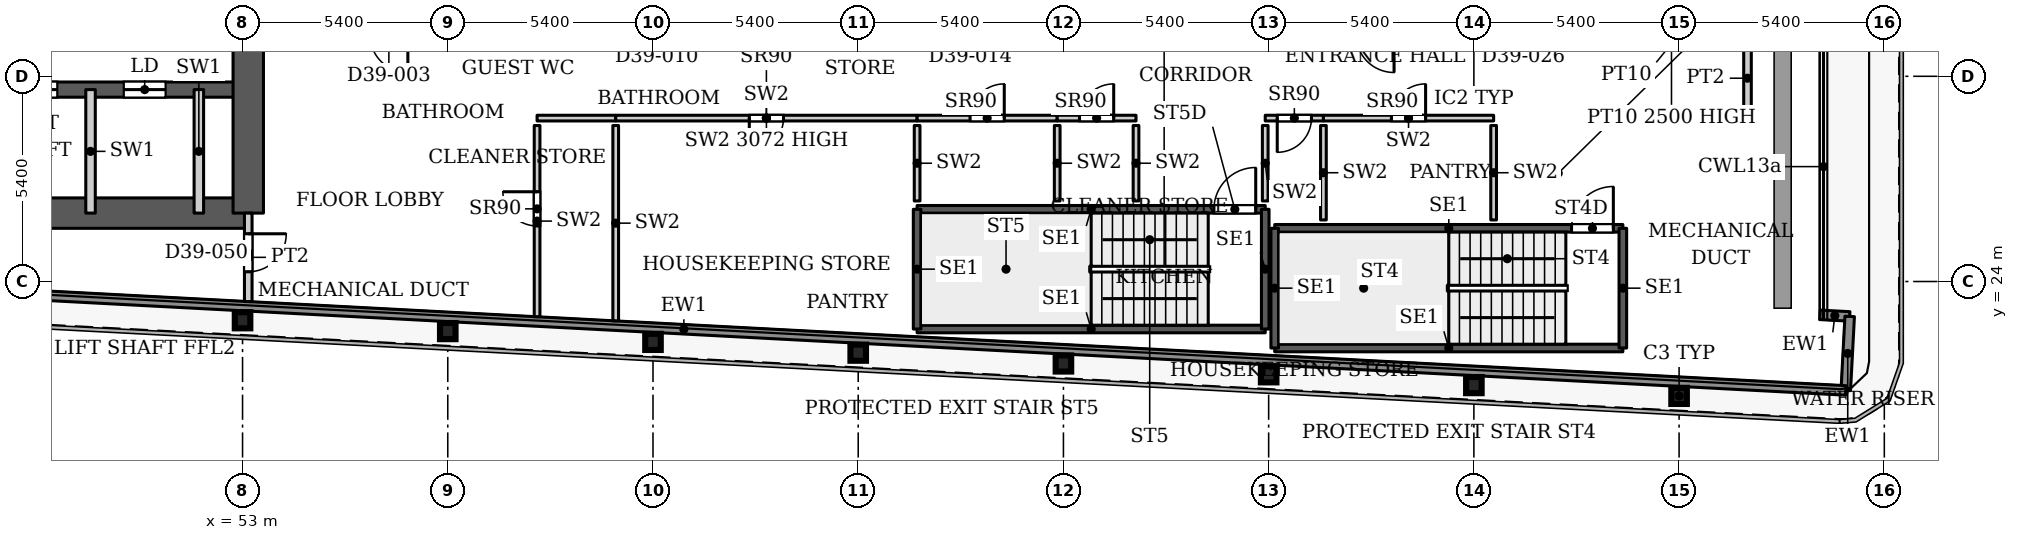
"""IFC4 building model, lengths in metres.
Left out: names, types, materials, properties, quantities, classifications, styles, units other than length and angle.
Written with IfcOpenShell. Run it as: python <this file> out.ifc"""

import sys

from ifc_helpers import new_model, si_unit, direction, frame, frame_2d, origin, origin_2d, place, context, subcontext, project, spatial, rectangle, i_section, extrude, source, transform, mapped, element, fill, save


model = new_model("IFC4")
c1 = context("Model", 3, precision=1e-05, world=origin(), true_north=direction((0.0, 1.0)))
c2 = subcontext(c1, "Body", "Model", "MODEL_VIEW")
j1 = project(units=[si_unit("LENGTHUNIT", "METRE"), si_unit("PLANEANGLEUNIT", "RADIAN")], contexts=[c1])
p1 = place(None, origin())
s1 = spatial("IfcSite", under=j1, at=p1, CompositionType="ELEMENT")
p2 = place(p1, origin())
s2 = spatial("IfcBuilding", under=s1, at=p2, CompositionType="ELEMENT")
p3 = place(p2, frame((0.0, 0.0, 168.2)))
s3 = spatial("IfcBuildingStorey", under=s2, at=p3, CompositionType="ELEMENT", Elevation=168.2)
for number, where, z_axis, x_axis in (
    (1, (90.8, 20.99, 0.0), (0.0, 0.0, 1.0), (1.0, 0.0, 0.0)),
    (2, (85.4, 21.274, 0.0), (0.0, 0.0, 1.0), (1.0, 0.0, 0.0)),
    (3, (80.0, 21.558, 0.0), (0.0, 0.0, 1.0), (1.0, 0.0, 0.0)),
    (4, (74.6, 21.843, 0.0), (0.0, 0.0, 1.0), (1.0, 0.0, 0.0)),
    (5, (69.2, 22.127, 0.0), (0.0, 0.0, 1.0), (1.0, 0.0, 0.0)),
    (6, (63.8, 22.411, 0.0), (0.0, 0.0, 1.0), (1.0, 0.0, 0.0)),
    (7, (58.4, 22.695, 0.0), (0.0, 0.0, 1.0), (1.0, 0.0, 0.0)),
    (8, (53.0, 22.98, 0.0), (0.0, 0.0, 1.0), (1.0, 0.0, 0.0)),
):
    element("IfcColumn", number, at=place(p3, frame(where, z_axis=z_axis, x_axis=x_axis)), inside=s3, PredefinedType="COLUMN", context=c2, shape_type="SweptSolid", body=[
        extrude(i_section(OverallWidth=0.409, OverallDepth=0.425, WebThickness=0.033, FlangeThickness=0.052, FilletRadius=0.013, at=origin_2d()), origin(), (0.0, 0.0, 1.0), 3.9),
    ])
p4 = place(p3, frame((34.75, 25.8, 0.0), z_axis=(0.0, 0.0, 1.0), x_axis=(1.0, 0.0, 0.0)))
e9 = element("IfcWall", 9, at=p4, inside=s3, PredefinedType="SHEAR", context=c2, shape_type="SweptSolid", body=[
    extrude(rectangle(XDim=18.4, YDim=0.8, at=frame_2d((9.2, 0.0))), origin(), (0.0, 0.0, 1.0), 3.9),
])
p5 = place(p3, frame((34.75, 29.05, 0.0), z_axis=(0.0, 0.0, 1.0), x_axis=(1.0, 0.0, 0.0)))
e10 = element("IfcWall", 10, at=p5, inside=s3, PredefinedType="SHEAR", context=c2, shape_type="SweptSolid", body=[
    extrude(rectangle(XDim=18.4, YDim=0.4, at=frame_2d((9.2, 0.0))), origin(), (0.0, 0.0, 1.0), 3.9),
])
p6 = place(p5, frame((0.875, 0.0, 0.0)))
e11 = element("IfcOpeningElement", 11, at=p6, cuts=e10, PredefinedType="OPENING", context=c2, shape_type="SweptSolid", body=[
    extrude(rectangle(XDim=1.1, YDim=2.2, at=frame_2d((0.55, 1.1))), frame((0.0, 0.21, 0.0), z_axis=(0.0, -1.0, 0.0), x_axis=(1.0, 0.0, 0.0)), (0.0, 0.0, 1.0), 0.42),
])
p7 = place(p5, frame((3.725, 0.0, 0.0)))
e12 = element("IfcOpeningElement", 12, at=p7, cuts=e10, PredefinedType="OPENING", context=c2, shape_type="SweptSolid", body=[
    extrude(rectangle(XDim=1.1, YDim=2.2, at=frame_2d((0.55, 1.1))), frame((0.0, 0.21, 0.0), z_axis=(0.0, -1.0, 0.0), x_axis=(1.0, 0.0, 0.0)), (0.0, 0.0, 1.0), 0.42),
])
p8 = place(p5, frame((6.575, 0.0, 0.0)))
e13 = element("IfcOpeningElement", 13, at=p8, cuts=e10, PredefinedType="OPENING", context=c2, shape_type="SweptSolid", body=[
    extrude(rectangle(XDim=1.1, YDim=2.2, at=frame_2d((0.55, 1.1))), frame((0.0, 0.21, 0.0), z_axis=(0.0, -1.0, 0.0), x_axis=(1.0, 0.0, 0.0)), (0.0, 0.0, 1.0), 0.42),
])
p9 = place(p5, frame((9.425, 0.0, 0.0)))
e14 = element("IfcOpeningElement", 14, at=p9, cuts=e10, PredefinedType="OPENING", context=c2, shape_type="SweptSolid", body=[
    extrude(rectangle(XDim=1.1, YDim=2.2, at=frame_2d((0.55, 1.1))), frame((0.0, 0.21, 0.0), z_axis=(0.0, -1.0, 0.0), x_axis=(1.0, 0.0, 0.0)), (0.0, 0.0, 1.0), 0.42),
])
p10 = place(p5, frame((12.275, 0.0, 0.0)))
e15 = element("IfcOpeningElement", 15, at=p10, cuts=e10, PredefinedType="OPENING", context=c2, shape_type="SweptSolid", body=[
    extrude(rectangle(XDim=1.1, YDim=2.2, at=frame_2d((0.55, 1.1))), frame((0.0, 0.21, 0.0), z_axis=(0.0, -1.0, 0.0), x_axis=(1.0, 0.0, 0.0)), (0.0, 0.0, 1.0), 0.42),
])
p11 = place(p5, frame((15.125, 0.0, 0.0)))
e16 = element("IfcOpeningElement", 16, at=p11, cuts=e10, PredefinedType="OPENING", context=c2, shape_type="SweptSolid", body=[
    extrude(rectangle(XDim=1.1, YDim=2.2, at=frame_2d((0.55, 1.1))), frame((0.0, 0.21, 0.0), z_axis=(0.0, -1.0, 0.0), x_axis=(1.0, 0.0, 0.0)), (0.0, 0.0, 1.0), 0.42),
])
p12 = place(p3, frame((53.15, 25.8, 0.0), z_axis=(0.0, 0.0, 1.0), x_axis=(0.0, 1.0, 0.0)))
e17 = element("IfcWall", 17, at=p12, inside=s3, PredefinedType="SHEAR", context=c2, shape_type="SweptSolid", body=[
    extrude(rectangle(XDim=10.4, YDim=0.8, at=frame_2d((5.2, 0.0))), origin(), (0.0, 0.0, 1.0), 3.9),
])
p13 = place(p3, frame((94.507, 23.123, 0.0), z_axis=(0.0, 0.0, 1.0), x_axis=(0.998561284263, -0.053622398031, 0.0)))
e18 = element("IfcWall", 18, at=p13, inside=s3, PredefinedType="SOLIDWALL", context=c2, shape_type="SweptSolid", body=[
    extrude(rectangle(XDim=0.783, YDim=0.25, at=frame_2d((0.392, 0.0))), origin(), (0.0, 0.0, 1.0), 3.75),
])
p14 = place(p3, frame((95.289, 23.081, 0.0), z_axis=(0.0, 0.0, 1.0), x_axis=(-0.052841433274, -0.998602915542, 0.0)))
e19 = element("IfcWall", 19, at=p14, inside=s3, PredefinedType="SOLIDWALL", context=c2, shape_type="SweptSolid", body=[
    extrude(rectangle(XDim=1.95, YDim=0.25, at=frame_2d((0.975, 0.0))), origin(), (0.0, 0.0, 1.0), 3.75),
])
p15 = place(p3, frame((95.186, 21.134, 0.0), z_axis=(0.0, 0.0, 1.0), x_axis=(-0.998617201448, 0.052570761569, 0.0)))
e20 = element("IfcWall", 20, at=p15, inside=s3, PredefinedType="SOLIDWALL", context=c2, shape_type="SweptSolid", body=[
    extrude(rectangle(XDim=61.232, YDim=0.25, at=frame_2d((30.616, 0.0))), origin(), (0.0, 0.0, 1.0), 3.75),
])
p16 = place(p3, frame((80.16, 22.25, 0.0), z_axis=(0.0, 0.0, 1.0), x_axis=(1.0, 0.0, 0.0)))
e21 = element("IfcWall", 21, at=p16, inside=s3, PredefinedType="SHEAR", context=c2, shape_type="SweptSolid", body=[
    extrude(rectangle(XDim=9.16, YDim=0.2, at=frame_2d((4.58, 0.0))), origin(), (0.0, 0.0, 1.0), 3.9),
])
p17 = place(p3, frame((80.16, 25.4, 0.0), z_axis=(0.0, 0.0, 1.0), x_axis=(1.0, 0.0, 0.0)))
e22 = element("IfcWall", 22, at=p17, inside=s3, PredefinedType="SHEAR", context=c2, shape_type="SweptSolid", body=[
    extrude(rectangle(XDim=9.16, YDim=0.2, at=frame_2d((4.58, 0.0))), origin(), (0.0, 0.0, 1.0), 3.9),
])
p18 = place(p17, frame((7.81, 0.0, 0.0)))
e23 = element("IfcOpeningElement", 23, at=p18, cuts=e22, PredefinedType="OPENING", context=c2, shape_type="SweptSolid", body=[
    extrude(rectangle(XDim=1.1, YDim=2.2, at=frame_2d((0.55, 1.1))), frame((0.0, 0.11, 0.0), z_axis=(0.0, -1.0, 0.0), x_axis=(1.0, 0.0, 0.0)), (0.0, 0.0, 1.0), 0.22),
])
for number, where, z_axis, x_axis in (
    (24, (80.16, 22.25, 0.0), (0.0, 0.0, 1.0), (0.0, 1.0, 0.0)),
    (25, (89.32, 22.25, 0.0), (0.0, 0.0, 1.0), (0.0, 1.0, 0.0)),
):
    element("IfcWall", number, at=place(p3, frame(where, z_axis=z_axis, x_axis=x_axis)), inside=s3, PredefinedType="SHEAR", context=c2, shape_type="SweptSolid", body=[
        extrude(rectangle(XDim=3.15, YDim=0.2, at=frame_2d((1.575, 0.0))), origin(), (0.0, 0.0, 1.0), 3.9),
    ])
p19 = place(p3, frame((70.75, 22.75, 0.0), z_axis=(0.0, 0.0, 1.0), x_axis=(1.0, 0.0, 0.0)))
e26 = element("IfcWall", 26, at=p19, inside=s3, PredefinedType="SHEAR", context=c2, shape_type="SweptSolid", body=[
    extrude(rectangle(XDim=9.16, YDim=0.2, at=frame_2d((4.58, 0.0))), origin(), (0.0, 0.0, 1.0), 3.9),
])
p20 = place(p3, frame((70.75, 25.9, 0.0), z_axis=(0.0, 0.0, 1.0), x_axis=(1.0, 0.0, 0.0)))
e27 = element("IfcWall", 27, at=p20, inside=s3, PredefinedType="SHEAR", context=c2, shape_type="SweptSolid", body=[
    extrude(rectangle(XDim=9.16, YDim=0.2, at=frame_2d((4.58, 0.0))), origin(), (0.0, 0.0, 1.0), 3.9),
])
p21 = place(p20, frame((7.81, 0.0, 0.0)))
e28 = element("IfcOpeningElement", 28, at=p21, cuts=e27, PredefinedType="OPENING", context=c2, shape_type="SweptSolid", body=[
    extrude(rectangle(XDim=1.1, YDim=2.2, at=frame_2d((0.55, 1.1))), frame((0.0, 0.11, 0.0), z_axis=(0.0, -1.0, 0.0), x_axis=(1.0, 0.0, 0.0)), (0.0, 0.0, 1.0), 0.22),
])
for number, where, z_axis, x_axis in (
    (29, (70.75, 22.75, 0.0), (0.0, 0.0, 1.0), (0.0, 1.0, 0.0)),
    (30, (79.91, 22.75, 0.0), (0.0, 0.0, 1.0), (0.0, 1.0, 0.0)),
):
    element("IfcWall", number, at=place(p3, frame(where, z_axis=z_axis, x_axis=x_axis)), inside=s3, PredefinedType="SHEAR", context=c2, shape_type="SweptSolid", body=[
        extrude(rectangle(XDim=3.15, YDim=0.2, at=frame_2d((1.575, 0.0))), origin(), (0.0, 0.0, 1.0), 3.9),
    ])
for number, where, z_axis, x_axis in (
    (31, (49.0, 25.8, 0.0), (0.0, 0.0, 1.0), (0.0, 1.0, 0.0)),
    (32, (51.85, 25.8, 0.0), (0.0, 0.0, 1.0), (0.0, 1.0, 0.0)),
):
    element("IfcWall", number, at=place(p3, frame(where, z_axis=z_axis, x_axis=x_axis)), inside=s3, PredefinedType="PARTITIONING", context=c2, shape_type="SweptSolid", body=[
        extrude(rectangle(XDim=3.25, YDim=0.25, at=frame_2d((1.625, 0.0))), origin(), (0.0, 0.0, 1.0), 3.9),
    ])
p22 = place(p3, frame((60.75, 28.3, 0.0), z_axis=(0.0, 0.0, 1.0), x_axis=(1.0, 0.0, 0.0)))
e33 = element("IfcWall", 33, at=p22, inside=s3, PredefinedType="PARTITIONING", context=c2, shape_type="SweptSolid", body=[
    extrude(rectangle(XDim=2.069, YDim=0.15, at=frame_2d((1.035, 0.0))), origin(), (0.0, 0.0, 1.0), 3.9),
])
p23 = place(p3, frame((60.75, 23.075, 0.0), z_axis=(0.0, 0.0, 1.0), x_axis=(0.0, 1.0, 0.0)))
e34 = element("IfcWall", 34, at=p23, inside=s3, PredefinedType="PARTITIONING", context=c2, shape_type="SweptSolid", body=[
    extrude(rectangle(XDim=5.03, YDim=0.15, at=frame_2d((2.515, 0.0))), origin(), (0.0, 0.0, 1.0), 3.9),
])
p24 = place(p23, frame((2.387, 0.0, 0.0)))
e35 = element("IfcOpeningElement", 35, at=p24, cuts=e34, PredefinedType="OPENING", context=c2, shape_type="SweptSolid", body=[
    extrude(rectangle(XDim=0.9, YDim=2.2, at=frame_2d((0.45, 1.1))), frame((0.0, 0.085, 0.0), z_axis=(0.0, -1.0, 0.0), x_axis=(1.0, 0.0, 0.0)), (0.0, 0.0, 1.0), 0.17),
])
p25 = place(p3, frame((62.819, 22.966, 0.0), z_axis=(0.0, 0.0, 1.0), x_axis=(0.0, 1.0, 0.0)))
e36 = element("IfcWall", 36, at=p25, inside=s3, PredefinedType="PARTITIONING", context=c2, shape_type="SweptSolid", body=[
    extrude(rectangle(XDim=5.139, YDim=0.15, at=frame_2d((2.569, 0.0))), origin(), (0.0, 0.0, 1.0), 3.9),
])
p26 = place(p3, frame((62.819, 28.3, 0.0), z_axis=(0.0, 0.0, 1.0), x_axis=(1.0, 0.0, 0.0)))
e37 = element("IfcWall", 37, at=p26, inside=s3, PredefinedType="PARTITIONING", context=c2, shape_type="SweptSolid", body=[
    extrude(rectangle(XDim=7.931, YDim=0.15, at=frame_2d((3.965, 0.0))), origin(), (0.0, 0.0, 1.0), 3.072),
])
p27 = place(p26, frame((3.515, 0.0, 0.0)))
e38 = element("IfcOpeningElement", 38, at=p27, cuts=e37, PredefinedType="OPENING", context=c2, shape_type="SweptSolid", body=[
    extrude(rectangle(XDim=0.9, YDim=2.2, at=frame_2d((0.45, 1.1))), frame((0.0, 0.085, 0.0), z_axis=(0.0, -1.0, 0.0), x_axis=(1.0, 0.0, 0.0)), (0.0, 0.0, 1.0), 0.17),
])
p28 = place(p3, frame((70.75, 26.12, 0.0), z_axis=(0.0, 0.0, 1.0), x_axis=(0.0, 1.0, 0.0)))
e39 = element("IfcWall", 39, at=p28, inside=s3, PredefinedType="PARTITIONING", context=c2, shape_type="SweptSolid", body=[
    extrude(rectangle(XDim=1.985, YDim=0.15, at=frame_2d((0.992, 0.0))), origin(), (0.0, 0.0, 1.0), 3.9),
])
p29 = place(p3, frame((70.75, 28.3, 0.0), z_axis=(0.0, 0.0, 1.0), x_axis=(1.0, 0.0, 0.0)))
e40 = element("IfcWall", 40, at=p29, inside=s3, PredefinedType="PARTITIONING", context=c2, shape_type="SweptSolid", body=[
    extrude(rectangle(XDim=3.686, YDim=0.15, at=frame_2d((1.843, 0.0))), origin(), (0.0, 0.0, 1.0), 3.9),
])
p30 = place(p29, frame((1.393, 0.0, 0.0)))
e41 = element("IfcOpeningElement", 41, at=p30, cuts=e40, PredefinedType="OPENING", context=c2, shape_type="SweptSolid", body=[
    extrude(rectangle(XDim=0.9, YDim=2.2, at=frame_2d((0.45, 1.1))), frame((0.0, 0.085, 0.0), z_axis=(0.0, -1.0, 0.0), x_axis=(1.0, 0.0, 0.0)), (0.0, 0.0, 1.0), 0.17),
])
p31 = place(p3, frame((74.436, 26.12, 0.0), z_axis=(0.0, 0.0, 1.0), x_axis=(0.0, 1.0, 0.0)))
e42 = element("IfcWall", 42, at=p31, inside=s3, PredefinedType="PARTITIONING", context=c2, shape_type="SweptSolid", body=[
    extrude(rectangle(XDim=1.985, YDim=0.15, at=frame_2d((0.992, 0.0))), origin(), (0.0, 0.0, 1.0), 3.9),
])
p32 = place(p3, frame((74.436, 28.3, 0.0), z_axis=(0.0, 0.0, 1.0), x_axis=(1.0, 0.0, 0.0)))
e43 = element("IfcWall", 43, at=p32, inside=s3, PredefinedType="PARTITIONING", context=c2, shape_type="SweptSolid", body=[
    extrude(rectangle(XDim=2.074, YDim=0.15, at=frame_2d((1.037, 0.0))), origin(), (0.0, 0.0, 1.0), 3.9),
])
p33 = place(p32, frame((0.587, 0.0, 0.0)))
e44 = element("IfcOpeningElement", 44, at=p33, cuts=e43, PredefinedType="OPENING", context=c2, shape_type="SweptSolid", body=[
    extrude(rectangle(XDim=0.9, YDim=2.2, at=frame_2d((0.45, 1.1))), frame((0.0, 0.085, 0.0), z_axis=(0.0, -1.0, 0.0), x_axis=(1.0, 0.0, 0.0)), (0.0, 0.0, 1.0), 0.17),
])
p34 = place(p3, frame((76.51, 26.12, 0.0), z_axis=(0.0, 0.0, 1.0), x_axis=(0.0, 1.0, 0.0)))
e45 = element("IfcWall", 45, at=p34, inside=s3, PredefinedType="PARTITIONING", context=c2, shape_type="SweptSolid", body=[
    extrude(rectangle(XDim=1.985, YDim=0.15, at=frame_2d((0.992, 0.0))), origin(), (0.0, 0.0, 1.0), 3.9),
])
p35 = place(p3, frame((79.91, 28.3, 0.0), z_axis=(0.0, 0.0, 1.0), x_axis=(1.0, 0.0, 0.0)))
e46 = element("IfcWall", 46, at=p35, inside=s3, PredefinedType="PARTITIONING", context=c2, shape_type="SweptSolid", body=[
    extrude(rectangle(XDim=1.531, YDim=0.15, at=frame_2d((0.766, 0.0))), origin(), (0.0, 0.0, 1.0), 3.9),
])
p36 = place(p35, frame((0.316, 0.0, 0.0)))
e47 = element("IfcOpeningElement", 47, at=p36, cuts=e46, PredefinedType="OPENING", context=c2, shape_type="SweptSolid", body=[
    extrude(rectangle(XDim=0.9, YDim=2.2, at=frame_2d((0.45, 1.1))), frame((0.0, 0.085, 0.0), z_axis=(0.0, -1.0, 0.0), x_axis=(1.0, 0.0, 0.0)), (0.0, 0.0, 1.0), 0.17),
])
p37 = place(p3, frame((79.91, 26.12, 0.0), z_axis=(0.0, 0.0, 1.0), x_axis=(0.0, 1.0, 0.0)))
e48 = element("IfcWall", 48, at=p37, inside=s3, PredefinedType="PARTITIONING", context=c2, shape_type="SweptSolid", body=[
    extrude(rectangle(XDim=1.985, YDim=0.15, at=frame_2d((0.992, 0.0))), origin(), (0.0, 0.0, 1.0), 3.9),
])
p38 = place(p3, frame((81.441, 25.62, 0.0), z_axis=(0.0, 0.0, 1.0), x_axis=(0.0, 1.0, 0.0)))
e49 = element("IfcWall", 49, at=p38, inside=s3, PredefinedType="PARTITIONING", context=c2, shape_type="SweptSolid", body=[
    extrude(rectangle(XDim=2.485, YDim=0.15, at=frame_2d((1.242, 0.0))), origin(), (0.0, 0.0, 1.0), 3.9),
])
p39 = place(p3, frame((81.441, 28.3, 0.0), z_axis=(0.0, 0.0, 1.0), x_axis=(1.0, 0.0, 0.0)))
e50 = element("IfcWall", 50, at=p39, inside=s3, PredefinedType="PARTITIONING", context=c2, shape_type="SweptSolid", body=[
    extrude(rectangle(XDim=4.479, YDim=0.15, at=frame_2d((2.24, 0.0))), origin(), (0.0, 0.0, 1.0), 3.9),
])
p40 = place(p39, frame((1.789, 0.0, 0.0)))
e51 = element("IfcOpeningElement", 51, at=p40, cuts=e50, PredefinedType="OPENING", context=c2, shape_type="SweptSolid", body=[
    extrude(rectangle(XDim=0.9, YDim=2.2, at=frame_2d((0.45, 1.1))), frame((0.0, 0.085, 0.0), z_axis=(0.0, -1.0, 0.0), x_axis=(1.0, 0.0, 0.0)), (0.0, 0.0, 1.0), 0.17),
])
p41 = place(p3, frame((85.92, 25.62, 0.0), z_axis=(0.0, 0.0, 1.0), x_axis=(0.0, 1.0, 0.0)))
e52 = element("IfcWall", 52, at=p41, inside=s3, PredefinedType="PARTITIONING", context=c2, shape_type="SweptSolid", body=[
    extrude(rectangle(XDim=2.485, YDim=0.15, at=frame_2d((1.242, 0.0))), origin(), (0.0, 0.0, 1.0), 3.9),
])
p42 = place(p3, frame((53.15, 23.472, 0.0), z_axis=(0.0, 0.0, 1.0), x_axis=(0.0, 1.0, 0.0)))
e53 = element("IfcWall", 53, at=p42, inside=s3, PredefinedType="PARTITIONING", context=c2, shape_type="SweptSolid", body=[
    extrude(rectangle(XDim=2.328, YDim=0.2, at=frame_2d((1.164, 0.0))), origin(), (0.0, 0.0, 1.0), 3.6),
])
p43 = place(p42, frame((0.784, 0.0, 0.0)))
e54 = element("IfcOpeningElement", 54, at=p43, cuts=e53, PredefinedType="OPENING", context=c2, shape_type="SweptSolid", body=[
    extrude(rectangle(XDim=1.0, YDim=2.1, at=frame_2d((0.5, 1.05))), frame((0.0, 0.11, 0.0), z_axis=(0.0, -1.0, 0.0), x_axis=(1.0, 0.0, 0.0)), (0.0, 0.0, 1.0), 0.22),
])
p44 = place(p3, frame((92.6, 28.3, 0.0), z_axis=(0.0, 0.0, 1.0), x_axis=(0.0, 1.0, 0.0)))
e55 = element("IfcWall", 55, at=p44, inside=s3, PredefinedType="PARTITIONING", context=c2, shape_type="SweptSolid", body=[
    extrude(rectangle(XDim=2.1, YDim=0.2, at=frame_2d((1.05, 0.0))), origin(), (0.0, 0.0, 1.0), 3.6),
])
m1 = source(origin(), c2, "Body", "SweptSolid", [
    extrude(rectangle(XDim=1.1, YDim=2.2, at=frame_2d((0.55, 1.1))), frame((0.0, 0.025, 0.0), z_axis=(0.0, -1.0, 0.0), x_axis=(1.0, 0.0, 0.0)), (0.0, 0.0, 1.0), 0.05),
])
p45 = place(p10, origin())
e56 = element("IfcDoor", 56, at=p45, inside=s3, OperationType="SLIDING_TO_LEFT", PredefinedType="DOOR", context=c2, shape_type="MappedRepresentation", body=[
    mapped(m1, transform((0.0, 0.0, 0.0), x_axis=(1.0, 0.0, 0.0), y_axis=(0.0, 1.0, 0.0), z_axis=(0.0, 0.0, 1.0), scale=1.0)),
])
fill(e15, e56)
p46 = place(p11, origin())
e57 = element("IfcDoor", 57, at=p46, inside=s3, OperationType="SLIDING_TO_LEFT", PredefinedType="DOOR", context=c2, shape_type="MappedRepresentation", body=[
    mapped(m1, transform((0.0, 0.0, 0.0), x_axis=(1.0, 0.0, 0.0), y_axis=(0.0, 1.0, 0.0), z_axis=(0.0, 0.0, 1.0), scale=1.0)),
])
fill(e16, e57)
m2 = source(origin(), c2, "Body", "SweptSolid", [
    extrude(rectangle(XDim=0.9, YDim=2.2, at=frame_2d((0.45, 1.1))), frame((0.0, 0.025, 0.0), z_axis=(0.0, -1.0, 0.0), x_axis=(1.0, 0.0, 0.0)), (0.0, 0.0, 1.0), 0.05),
])
p47 = place(p24, origin())
e58 = element("IfcDoor", 58, at=p47, inside=s3, OperationType="SINGLE_SWING_LEFT", PredefinedType="DOOR", context=c2, shape_type="MappedRepresentation", body=[
    mapped(m2, transform((0.0, 0.0, 0.0), x_axis=(1.0, 0.0, 0.0), y_axis=(0.0, 1.0, 0.0), z_axis=(0.0, 0.0, 1.0), scale=1.0)),
])
fill(e35, e58)
p48 = place(p27, origin())
e59 = element("IfcDoor", 59, at=p48, inside=s3, OperationType="SINGLE_SWING_RIGHT", PredefinedType="DOOR", context=c2, shape_type="MappedRepresentation", body=[
    mapped(m2, transform((0.0, 0.0, 0.0), x_axis=(1.0, 0.0, 0.0), y_axis=(0.0, 1.0, 0.0), z_axis=(0.0, 0.0, 1.0), scale=1.0)),
])
fill(e38, e59)
p49 = place(p30, origin())
e60 = element("IfcDoor", 60, at=p49, inside=s3, OperationType="SINGLE_SWING_LEFT", PredefinedType="DOOR", context=c2, shape_type="MappedRepresentation", body=[
    mapped(m2, transform((0.0, 0.0, 0.0), x_axis=(1.0, 0.0, 0.0), y_axis=(0.0, 1.0, 0.0), z_axis=(0.0, 0.0, 1.0), scale=1.0)),
])
fill(e41, e60)
p50 = place(p33, origin())
e61 = element("IfcDoor", 61, at=p50, inside=s3, OperationType="SINGLE_SWING_LEFT", PredefinedType="DOOR", context=c2, shape_type="MappedRepresentation", body=[
    mapped(m2, transform((0.0, 0.0, 0.0), x_axis=(1.0, 0.0, 0.0), y_axis=(0.0, 1.0, 0.0), z_axis=(0.0, 0.0, 1.0), scale=1.0)),
])
fill(e44, e61)
p51 = place(p36, origin())
e62 = element("IfcDoor", 62, at=p51, inside=s3, OperationType="SINGLE_SWING_RIGHT", PredefinedType="DOOR", context=c2, shape_type="MappedRepresentation", body=[
    mapped(m2, transform((0.0, 0.0, 0.0), x_axis=(1.0, 0.0, 0.0), y_axis=(0.0, 1.0, 0.0), z_axis=(0.0, 0.0, 1.0), scale=1.0)),
])
fill(e47, e62)
p52 = place(p40, origin())
e63 = element("IfcDoor", 63, at=p52, inside=s3, OperationType="SINGLE_SWING_LEFT", PredefinedType="DOOR", context=c2, shape_type="MappedRepresentation", body=[
    mapped(m2, transform((0.0, 0.0, 0.0), x_axis=(1.0, 0.0, 0.0), y_axis=(0.0, 1.0, 0.0), z_axis=(0.0, 0.0, 1.0), scale=1.0)),
])
fill(e51, e63)
m3 = source(origin(), c2, "Body", "SweptSolid", [
    extrude(rectangle(XDim=1.1, YDim=2.2, at=frame_2d((0.55, 1.1))), frame((0.0, 0.025, 0.0), z_axis=(0.0, -1.0, 0.0), x_axis=(1.0, 0.0, 0.0)), (0.0, 0.0, 1.0), 0.05),
])
p53 = place(p18, origin())
e64 = element("IfcDoor", 64, at=p53, inside=s3, OperationType="SINGLE_SWING_LEFT", PredefinedType="DOOR", context=c2, shape_type="MappedRepresentation", body=[
    mapped(m3, transform((0.0, 0.0, 0.0), x_axis=(1.0, 0.0, 0.0), y_axis=(0.0, 1.0, 0.0), z_axis=(0.0, 0.0, 1.0), scale=1.0)),
])
fill(e23, e64)
p54 = place(p21, origin())
e65 = element("IfcDoor", 65, at=p54, inside=s3, OperationType="SINGLE_SWING_LEFT", PredefinedType="DOOR", context=c2, shape_type="MappedRepresentation", body=[
    mapped(m3, transform((0.0, 0.0, 0.0), x_axis=(1.0, 0.0, 0.0), y_axis=(0.0, 1.0, 0.0), z_axis=(0.0, 0.0, 1.0), scale=1.0)),
])
fill(e28, e65)
m4 = source(origin(), c2, "Body", "SweptSolid", [
    extrude(rectangle(XDim=1.0, YDim=2.1, at=frame_2d((0.5, 1.05))), frame((0.0, 0.025, 0.0), z_axis=(0.0, -1.0, 0.0), x_axis=(1.0, 0.0, 0.0)), (0.0, 0.0, 1.0), 0.05),
])
p55 = place(p43, origin())
e66 = element("IfcDoor", 66, at=p55, inside=s3, OperationType="SINGLE_SWING_RIGHT", PredefinedType="DOOR", context=c2, shape_type="MappedRepresentation", body=[
    mapped(m4, transform((0.0, 0.0, 0.0), x_axis=(1.0, 0.0, 0.0), y_axis=(0.0, 1.0, 0.0), z_axis=(0.0, 0.0, 1.0), scale=1.0)),
])
fill(e54, e66)
save(model, sys.argv[1])
